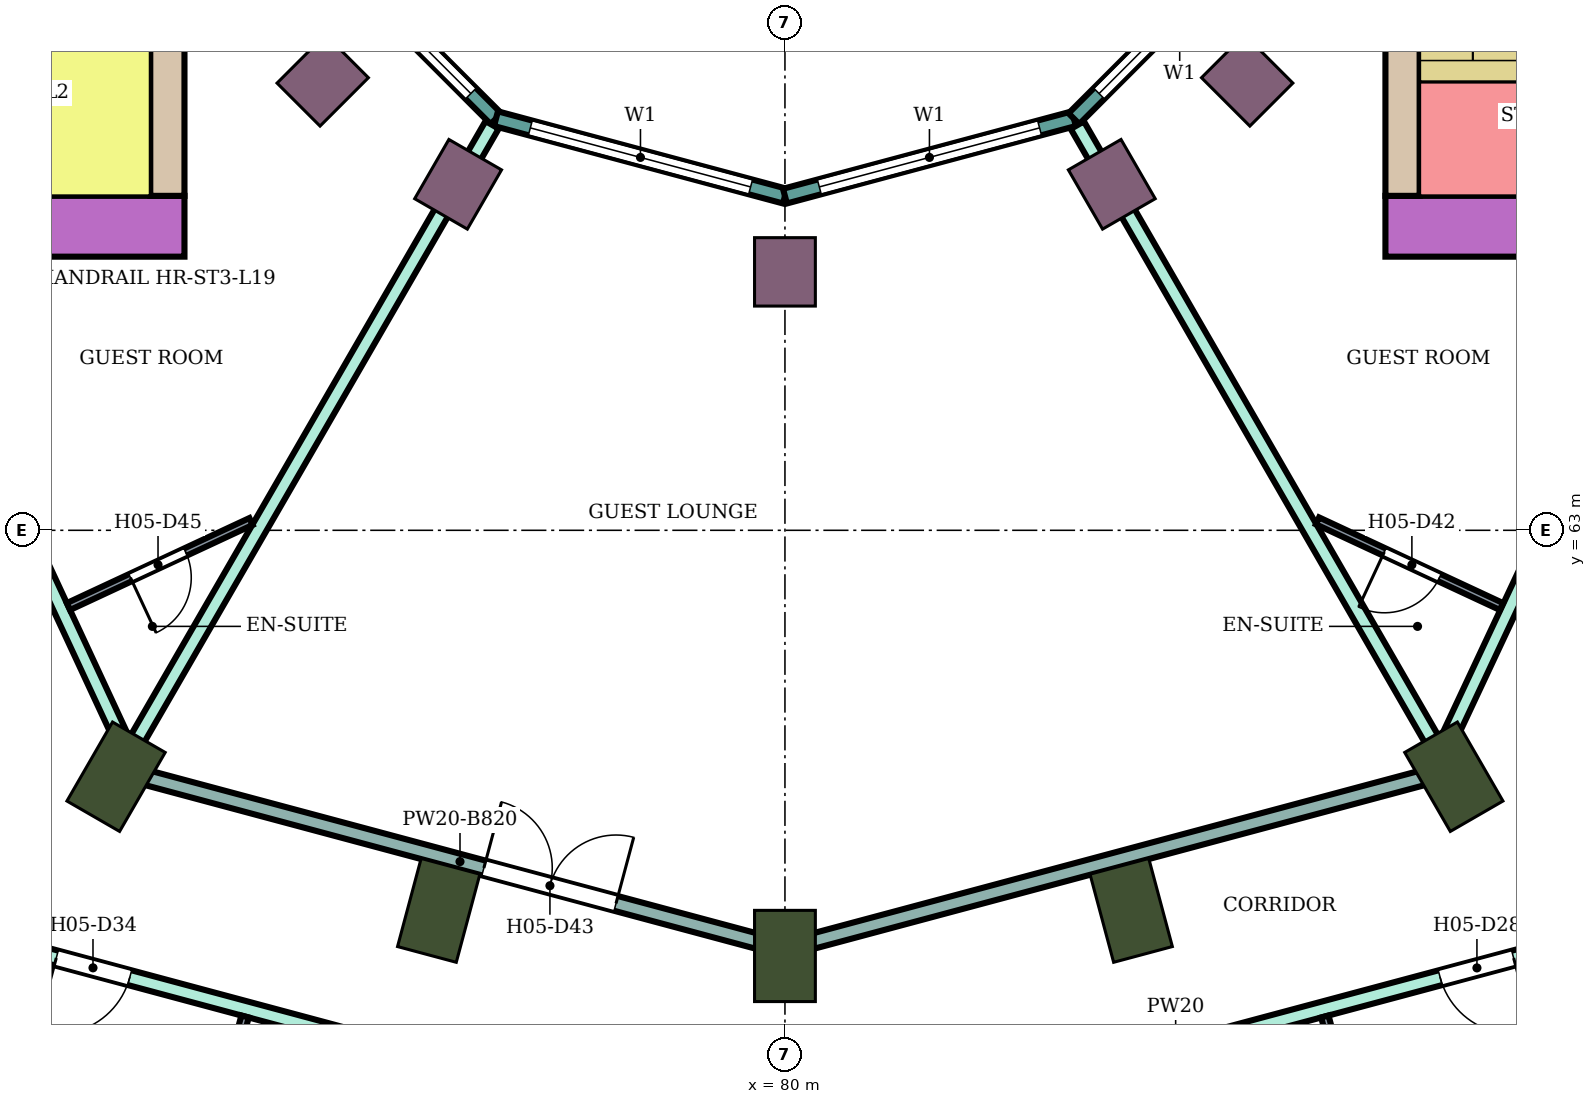
"""IFC4 building model, lengths in metres.
Left out: names, types, materials, properties, quantities, classifications, styles, units other than length and angle.
Written with IfcOpenShell. Run it as: python <this file> out.ifc"""

import sys

from ifc_helpers import new_model, si_unit, direction, frame, frame_2d, origin, origin_2d, place, context, subcontext, project, spatial, rectangle, extrude, element, fill, save


model = new_model("IFC4")
c1 = context("Model", 3, precision=1e-05, world=origin(), true_north=direction((0.0, 1.0)))
c2 = subcontext(c1, "Body", "Model", "MODEL_VIEW")
j1 = project(units=[si_unit("LENGTHUNIT", "METRE"), si_unit("PLANEANGLEUNIT", "RADIAN")], contexts=[c1])
p1 = place(None, origin())
s1 = spatial("IfcSite", under=j1, at=p1, CompositionType="ELEMENT")
p2 = place(p1, origin())
s2 = spatial("IfcBuilding", under=s1, at=p2, CompositionType="ELEMENT")
p3 = place(p2, frame((0.0, 0.0, 86.2)))
s3 = spatial("IfcBuildingStorey", under=s2, at=p3, CompositionType="ELEMENT", Elevation=86.2)
for number, where, z_axis, x_axis in (
    (1, (71.2, 59.758, 0.0), (0.0, 0.0, 1.0), (-0.5, -0.866, 0.0)),
    (2, (75.445, 58.0, 0.0), (0.0, 0.0, 1.0), (-0.259, -0.966, 0.0)),
    (3, (80.0, 57.4, 0.0), (0.0, 0.0, 1.0), (0.0, -1.0, 0.0)),
    (4, (84.555, 58.0, 0.0), (0.0, 0.0, 1.0), (0.259, -0.966, 0.0)),
    (5, (88.8, 59.758, 0.0), (0.0, 0.0, 1.0), (0.5, -0.866, 0.0)),
):
    element("IfcColumn", number, at=place(p3, frame(where, z_axis=z_axis, x_axis=x_axis)), inside=s3, PredefinedType="COLUMN", context=c2, shape_type="SweptSolid", body=[
        extrude(rectangle(XDim=1.2, YDim=0.8, at=origin_2d()), origin(), (0.0, 0.0, 1.0), 3.8),
    ])
for number, where, z_axis, x_axis in (
    (6, (73.919, 68.919, 0.0), (0.0, 0.0, 1.0), (-0.707, -0.707, 0.0)),
    (7, (75.7, 67.552, 0.0), (0.0, 0.0, 1.0), (-0.5, -0.866, 0.0)),
    (8, (80.0, 66.4, 0.0), (0.0, 0.0, 1.0), (0.0, -1.0, 0.0)),
    (9, (84.3, 67.552, 0.0), (0.0, 0.0, 1.0), (0.5, -0.866, 0.0)),
    (10, (86.081, 68.919, 0.0), (0.0, 0.0, 1.0), (0.707, -0.707, 0.0)),
):
    element("IfcColumn", number, at=place(p3, frame(where, z_axis=z_axis, x_axis=x_axis)), inside=s3, PredefinedType="COLUMN", context=c2, shape_type="SweptSolid", body=[
        extrude(rectangle(XDim=0.9, YDim=0.8, at=origin_2d()), origin(), (0.0, 0.0, 1.0), 3.8),
    ])
p4 = place(p3, frame((87.9, 67.0, 0.0), z_axis=(0.0, 0.0, 1.0), x_axis=(1.0, 0.0, 0.0)))
e11 = element("IfcWall", 11, at=p4, inside=s3, PredefinedType="SHEAR", context=c2, shape_type="SweptSolid", body=[
    extrude(rectangle(XDim=14.7, YDim=0.8, at=frame_2d((7.35, 0.0))), origin(), (0.0, 0.0, 1.0), 3.48),
])
p5 = place(p4, frame((4.2, 0.0, 0.0)))
e12 = element("IfcOpeningElement", 12, at=p5, cuts=e11, PredefinedType="OPENING", context=c2, shape_type="SweptSolid", body=[
    extrude(rectangle(XDim=2.4, YDim=2.4, at=frame_2d((1.2, 1.2))), frame((0.0, 0.41, 0.0), z_axis=(0.0, -1.0, 0.0), x_axis=(1.0, 0.0, 0.0)), (0.0, 0.0, 1.0), 0.82),
])
p6 = place(p3, frame((88.125, 67.4, 0.0), z_axis=(0.0, 0.0, 1.0), x_axis=(0.0, 1.0, 0.0)))
e13 = element("IfcWall", 13, at=p6, inside=s3, PredefinedType="SHEAR", context=c2, shape_type="SweptSolid", body=[
    extrude(rectangle(XDim=7.6, YDim=0.45, at=frame_2d((3.8, 0.0))), origin(), (0.0, 0.0, 1.0), 3.48),
])
p7 = place(p3, frame((72.1, 67.0, 0.0), z_axis=(0.0, 0.0, 1.0), x_axis=(-1.0, 0.0, 0.0)))
e14 = element("IfcWall", 14, at=p7, inside=s3, PredefinedType="SHEAR", context=c2, shape_type="SweptSolid", body=[
    extrude(rectangle(XDim=14.7, YDim=0.8, at=frame_2d((7.35, 0.0))), origin(), (0.0, 0.0, 1.0), 3.48),
])
p8 = place(p7, frame((4.2, 0.0, 0.0)))
e15 = element("IfcOpeningElement", 15, at=p8, cuts=e14, PredefinedType="OPENING", context=c2, shape_type="SweptSolid", body=[
    extrude(rectangle(XDim=2.4, YDim=2.4, at=frame_2d((1.2, 1.2))), frame((0.0, 0.41, 0.0), z_axis=(0.0, -1.0, 0.0), x_axis=(1.0, 0.0, 0.0)), (0.0, 0.0, 1.0), 0.82),
])
p9 = place(p3, frame((71.875, 75.0, 0.0), z_axis=(0.0, 0.0, 1.0), x_axis=(0.0, -1.0, 0.0)))
e16 = element("IfcWall", 16, at=p9, inside=s3, PredefinedType="SHEAR", context=c2, shape_type="SweptSolid", body=[
    extrude(rectangle(XDim=7.6, YDim=0.45, at=frame_2d((3.8, 0.0))), origin(), (0.0, 0.0, 1.0), 3.48),
])
p10 = place(p3, frame((73.415, 71.198, 0.0), z_axis=(0.0, 0.0, 1.0), x_axis=(0.707106781187, -0.707106781187, 0.0)))
e17 = element("IfcWall", 17, at=p10, inside=s3, PredefinedType="NOTDEFINED", context=c2, shape_type="SweptSolid", body=[
    extrude(rectangle(XDim=3.936, YDim=0.2, at=frame_2d((1.968, 0.0))), origin(), (0.0, 0.0, 1.0), 3.8),
])
p11 = place(p10, frame((0.468, 0.0, 0.9)))
e18 = element("IfcOpeningElement", 18, at=p11, cuts=e17, PredefinedType="OPENING", context=c2, shape_type="SweptSolid", body=[
    extrude(rectangle(XDim=3.0, YDim=2.3, at=frame_2d((1.5, 1.15))), frame((0.0, 0.11, 0.0), z_axis=(0.0, -1.0, 0.0), x_axis=(1.0, 0.0, 0.0)), (0.0, 0.0, 1.0), 0.22),
])
p12 = place(p3, frame((76.198, 68.415, 0.0), z_axis=(0.0, 0.0, 1.0), x_axis=(0.965933654434, -0.258789828301, 0.0)))
e19 = element("IfcWall", 19, at=p12, inside=s3, PredefinedType="NOTDEFINED", context=c2, shape_type="SweptSolid", body=[
    extrude(rectangle(XDim=3.936, YDim=0.2, at=frame_2d((1.968, 0.0))), origin(), (0.0, 0.0, 1.0), 3.8),
])
p13 = place(p12, frame((0.468, 0.0, 0.9)))
e20 = element("IfcOpeningElement", 20, at=p13, cuts=e19, PredefinedType="OPENING", context=c2, shape_type="SweptSolid", body=[
    extrude(rectangle(XDim=3.0, YDim=2.3, at=frame_2d((1.5, 1.15))), frame((0.0, 0.11, 0.0), z_axis=(0.0, -1.0, 0.0), x_axis=(1.0, 0.0, 0.0)), (0.0, 0.0, 1.0), 0.22),
])
p14 = place(p3, frame((80.0, 67.396, 0.0), z_axis=(0.0, 0.0, 1.0), x_axis=(0.965933654434, 0.258789828301, 0.0)))
e21 = element("IfcWall", 21, at=p14, inside=s3, PredefinedType="NOTDEFINED", context=c2, shape_type="SweptSolid", body=[
    extrude(rectangle(XDim=3.936, YDim=0.2, at=frame_2d((1.968, 0.0))), origin(), (0.0, 0.0, 1.0), 3.8),
])
p15 = place(p14, frame((0.468, 0.0, 0.9)))
e22 = element("IfcOpeningElement", 22, at=p15, cuts=e21, PredefinedType="OPENING", context=c2, shape_type="SweptSolid", body=[
    extrude(rectangle(XDim=3.0, YDim=2.3, at=frame_2d((1.5, 1.15))), frame((0.0, 0.11, 0.0), z_axis=(0.0, -1.0, 0.0), x_axis=(1.0, 0.0, 0.0)), (0.0, 0.0, 1.0), 0.22),
])
p16 = place(p3, frame((83.802, 68.415, 0.0), z_axis=(0.0, 0.0, 1.0), x_axis=(0.707106781187, 0.707106781187, 0.0)))
e23 = element("IfcWall", 23, at=p16, inside=s3, PredefinedType="NOTDEFINED", context=c2, shape_type="SweptSolid", body=[
    extrude(rectangle(XDim=3.936, YDim=0.2, at=frame_2d((1.968, 0.0))), origin(), (0.0, 0.0, 1.0), 3.8),
])
p17 = place(p16, frame((0.468, 0.0, 0.9)))
e24 = element("IfcOpeningElement", 24, at=p17, cuts=e23, PredefinedType="OPENING", context=c2, shape_type="SweptSolid", body=[
    extrude(rectangle(XDim=3.0, YDim=2.3, at=frame_2d((1.5, 1.15))), frame((0.0, 0.11, 0.0), z_axis=(0.0, -1.0, 0.0), x_axis=(1.0, 0.0, 0.0)), (0.0, 0.0, 1.0), 0.22),
])
p18 = place(p3, frame((68.321, 66.6, 0.0), z_axis=(0.0, 0.0, 1.0), x_axis=(0.421914092414, -0.906635813666, 0.0)))
e25 = element("IfcWall", 25, at=p18, inside=s3, PredefinedType="PARTITIONING", context=c2, shape_type="SweptSolid", body=[
    extrude(rectangle(XDim=7.459, YDim=0.2, at=frame_2d((3.73, 0.0))), origin(), (0.0, 0.0, 1.0), 3.35),
])
p19 = place(p18, frame((0.7, 0.0, 0.0)))
e26 = element("IfcOpeningElement", 26, at=p19, cuts=e25, PredefinedType="OPENING", context=c2, shape_type="SweptSolid", body=[
    extrude(rectangle(XDim=1.0, YDim=2.1, at=frame_2d((0.5, 1.05))), frame((0.0, 0.11, 0.0), z_axis=(0.0, -1.0, 0.0), x_axis=(1.0, 0.0, 0.0)), (0.0, 0.0, 1.0), 0.22),
])
p20 = place(p3, frame((69.652, 57.578, 0.0), z_axis=(0.0, 0.0, 1.0), x_axis=(0.965857425723, -0.259074184695, 0.0)))
e27 = element("IfcWall", 27, at=p20, inside=s3, PredefinedType="PARTITIONING", context=c2, shape_type="SweptSolid", body=[
    extrude(rectangle(XDim=10.623, YDim=0.2, at=frame_2d((5.312, 0.0))), origin(), (0.0, 0.0, 1.0), 3.35),
])
p21 = place(p20, frame((9.163, 0.0, 0.0)))
e28 = element("IfcOpeningElement", 28, at=p21, cuts=e27, PredefinedType="OPENING", context=c2, shape_type="SweptSolid", body=[
    extrude(rectangle(XDim=1.0, YDim=2.1, at=frame_2d((0.5, 1.05))), frame((0.0, 0.11, 0.0), z_axis=(0.0, -1.0, 0.0), x_axis=(1.0, 0.0, 0.0)), (0.0, 0.0, 1.0), 0.22),
])
p22 = place(p20, frame((0.788, 0.0, 0.0)))
e29 = element("IfcOpeningElement", 29, at=p22, cuts=e27, PredefinedType="OPENING", context=c2, shape_type="SweptSolid", body=[
    extrude(rectangle(XDim=1.0, YDim=2.1, at=frame_2d((0.5, 1.05))), frame((0.0, 0.11, 0.0), z_axis=(0.0, -1.0, 0.0), x_axis=(1.0, 0.0, 0.0)), (0.0, 0.0, 1.0), 0.22),
])
p23 = place(p3, frame((71.459, 60.218, 0.0), z_axis=(0.0, 0.0, 1.0), x_axis=(0.500232027118, 0.865891401416, 0.0)))
e30 = element("IfcWall", 30, at=p23, inside=s3, PredefinedType="PARTITIONING", context=c2, shape_type="SweptSolid", body=[
    extrude(rectangle(XDim=9.372, YDim=0.2, at=frame_2d((4.686, 0.0))), origin(), (0.0, 0.0, 1.0), 3.35),
])
p24 = place(p3, frame((71.498, 59.774, 0.0), z_axis=(0.0, 0.0, 1.0), x_axis=(0.965911938046, -0.258870871168, 0.0)))
e31 = element("IfcWall", 31, at=p24, inside=s3, PredefinedType="PARTITIONING", context=c2, shape_type="SweptSolid", body=[
    extrude(rectangle(XDim=8.752, YDim=0.2, at=frame_2d((4.376, 0.0))), origin(), (0.0, 0.0, 1.0), 2.98),
])
p25 = place(p24, frame((4.701, 0.0, 0.0)))
e32 = element("IfcOpeningElement", 32, at=p25, cuts=e31, PredefinedType="OPENING", context=c2, shape_type="SweptSolid", body=[
    extrude(rectangle(XDim=1.8, YDim=2.1, at=frame_2d((0.9, 1.05))), frame((0.0, 0.11, 0.0), z_axis=(0.0, -1.0, 0.0), x_axis=(1.0, 0.0, 0.0)), (0.0, 0.0, 1.0), 0.22),
])
p26 = place(p3, frame((80.0, 54.805, 0.0), z_axis=(0.0, 0.0, 1.0), x_axis=(0.965962177934, 0.258683340788, 0.0)))
e33 = element("IfcWall", 33, at=p26, inside=s3, PredefinedType="PARTITIONING", context=c2, shape_type="SweptSolid", body=[
    extrude(rectangle(XDim=10.643, YDim=0.2, at=frame_2d((5.322, 0.0))), origin(), (0.0, 0.0, 1.0), 3.35),
])
p27 = place(p26, frame((8.925, 0.0, 0.0)))
e34 = element("IfcOpeningElement", 34, at=p27, cuts=e33, PredefinedType="OPENING", context=c2, shape_type="SweptSolid", body=[
    extrude(rectangle(XDim=1.0, YDim=2.1, at=frame_2d((0.5, 1.05))), frame((0.0, 0.11, 0.0), z_axis=(0.0, -1.0, 0.0), x_axis=(1.0, 0.0, 0.0)), (0.0, 0.0, 1.0), 0.22),
])
p28 = place(p26, frame((0.55, 0.0, 0.0)))
e35 = element("IfcOpeningElement", 35, at=p28, cuts=e33, PredefinedType="OPENING", context=c2, shape_type="SweptSolid", body=[
    extrude(rectangle(XDim=1.0, YDim=2.1, at=frame_2d((0.5, 1.05))), frame((0.0, 0.11, 0.0), z_axis=(0.0, -1.0, 0.0), x_axis=(1.0, 0.0, 0.0)), (0.0, 0.0, 1.0), 0.22),
])
p29 = place(p3, frame((80.0, 57.496, 0.0), z_axis=(0.0, 0.0, 1.0), x_axis=(0.96592471314, 0.258823199396, 0.0)))
e36 = element("IfcWall", 36, at=p29, inside=s3, PredefinedType="PARTITIONING", context=c2, shape_type="SweptSolid", body=[
    extrude(rectangle(XDim=8.732, YDim=0.2, at=frame_2d((4.366, 0.0))), origin(), (0.0, 0.0, 1.0), 2.98),
])
p30 = place(p3, frame((83.846, 68.33, 0.0), z_axis=(0.0, 0.0, 1.0), x_axis=(0.499822319857, -0.866127963163, 0.0)))
e37 = element("IfcWall", 37, at=p30, inside=s3, PredefinedType="PARTITIONING", context=c2, shape_type="SweptSolid", body=[
    extrude(rectangle(XDim=9.382, YDim=0.2, at=frame_2d((4.691, 0.0))), origin(), (0.0, 0.0, 1.0), 3.35),
])
p31 = place(p3, frame((88.501, 59.775, 0.0), z_axis=(0.0, 0.0, 1.0), x_axis=(0.424700525505, 0.905333896215, 0.0)))
e38 = element("IfcWall", 38, at=p31, inside=s3, PredefinedType="PARTITIONING", context=c2, shape_type="SweptSolid", body=[
    extrude(rectangle(XDim=7.53, YDim=0.2, at=frame_2d((3.765, 0.0))), origin(), (0.0, 0.0, 1.0), 3.35),
])
p32 = place(p31, frame((5.83, 0.0, 0.0)))
e39 = element("IfcOpeningElement", 39, at=p32, cuts=e38, PredefinedType="OPENING", context=c2, shape_type="SweptSolid", body=[
    extrude(rectangle(XDim=1.0, YDim=2.1, at=frame_2d((0.5, 1.05))), frame((0.0, 0.11, 0.0), z_axis=(0.0, -1.0, 0.0), x_axis=(1.0, 0.0, 0.0)), (0.0, 0.0, 1.0), 0.22),
])
p33 = place(p3, frame((70.574, 61.997, 0.0), z_axis=(0.0, 0.0, 1.0), x_axis=(0.906503026865, 0.422199315826, 0.0)))
e40 = element("IfcWall", 40, at=p33, inside=s3, PredefinedType="PARTITIONING", context=c2, shape_type="SweptSolid", body=[
    extrude(rectangle(XDim=2.65, YDim=0.1, at=frame_2d((1.325, 0.0))), origin(), (0.0, 0.0, 1.0), 3.35),
])
p34 = place(p33, frame((0.9, 0.0, 0.0)))
e41 = element("IfcOpeningElement", 41, at=p34, cuts=e40, PredefinedType="OPENING", context=c2, shape_type="SweptSolid", body=[
    extrude(rectangle(XDim=0.8, YDim=2.1, at=frame_2d((0.4, 1.05))), frame((0.0, 0.06, 0.0), z_axis=(0.0, -1.0, 0.0), x_axis=(1.0, 0.0, 0.0)), (0.0, 0.0, 1.0), 0.12),
])
p35 = place(p3, frame((72.211, 54.044, 0.0), z_axis=(0.0, 0.0, 1.0), x_axis=(0.258866552082, 0.96591309558, 0.0)))
e42 = element("IfcWall", 42, at=p35, inside=s3, PredefinedType="PARTITIONING", context=c2, shape_type="SweptSolid", body=[
    extrude(rectangle(XDim=2.65, YDim=0.1, at=frame_2d((1.325, 0.0))), origin(), (0.0, 0.0, 1.0), 3.35),
])
p36 = place(p35, frame((0.95, 0.0, 0.0)))
e43 = element("IfcOpeningElement", 43, at=p36, cuts=e42, PredefinedType="OPENING", context=c2, shape_type="SweptSolid", body=[
    extrude(rectangle(XDim=0.8, YDim=2.1, at=frame_2d((0.4, 1.05))), frame((0.0, 0.06, 0.0), z_axis=(0.0, -1.0, 0.0), x_axis=(1.0, 0.0, 0.0)), (0.0, 0.0, 1.0), 0.12),
])
p37 = place(p3, frame((87.006, 63.124, 0.0), z_axis=(0.0, 0.0, 1.0), x_axis=(0.906535604863, -0.422129360642, 0.0)))
e44 = element("IfcWall", 44, at=p37, inside=s3, PredefinedType="PARTITIONING", context=c2, shape_type="SweptSolid", body=[
    extrude(rectangle(XDim=2.67, YDim=0.1, at=frame_2d((1.335, 0.0))), origin(), (0.0, 0.0, 1.0), 3.35),
])
p38 = place(p37, frame((0.97, 0.0, 0.0)))
e45 = element("IfcOpeningElement", 45, at=p38, cuts=e44, PredefinedType="OPENING", context=c2, shape_type="SweptSolid", body=[
    extrude(rectangle(XDim=0.8, YDim=2.1, at=frame_2d((0.4, 1.05))), frame((0.0, 0.06, 0.0), z_axis=(0.0, -1.0, 0.0), x_axis=(1.0, 0.0, 0.0)), (0.0, 0.0, 1.0), 0.12),
])
p39 = place(p3, frame((87.103, 56.604, 0.0), z_axis=(0.0, 0.0, 1.0), x_axis=(0.258883730688, -0.965908491517, 0.0)))
e46 = element("IfcWall", 46, at=p39, inside=s3, PredefinedType="PARTITIONING", context=c2, shape_type="SweptSolid", body=[
    extrude(rectangle(XDim=2.7, YDim=0.1, at=frame_2d((1.35, 0.0))), origin(), (0.0, 0.0, 1.0), 3.35),
])
p40 = place(p39, frame((0.9, 0.0, 0.0)))
e47 = element("IfcOpeningElement", 47, at=p40, cuts=e46, PredefinedType="OPENING", context=c2, shape_type="SweptSolid", body=[
    extrude(rectangle(XDim=0.8, YDim=2.1, at=frame_2d((0.4, 1.05))), frame((0.0, 0.06, 0.0), z_axis=(0.0, -1.0, 0.0), x_axis=(1.0, 0.0, 0.0)), (0.0, 0.0, 1.0), 0.12),
])
p41 = place(p11, origin())
e48 = element("IfcWindow", 48, at=p41, inside=s3, PartitioningType="SINGLE_PANEL", PredefinedType="WINDOW", context=c2, shape_type="SweptSolid", body=[
    extrude(rectangle(XDim=3.0, YDim=2.3, at=frame_2d((1.5, 1.15))), frame((0.0, 0.03, 0.0), z_axis=(0.0, -1.0, 0.0), x_axis=(1.0, 0.0, 0.0)), (0.0, 0.0, 1.0), 0.06),
])
fill(e18, e48)
p42 = place(p13, origin())
e49 = element("IfcWindow", 49, at=p42, inside=s3, PartitioningType="SINGLE_PANEL", PredefinedType="WINDOW", context=c2, shape_type="SweptSolid", body=[
    extrude(rectangle(XDim=3.0, YDim=2.3, at=frame_2d((1.5, 1.15))), frame((0.0, 0.03, 0.0), z_axis=(0.0, -1.0, 0.0), x_axis=(1.0, 0.0, 0.0)), (0.0, 0.0, 1.0), 0.06),
])
fill(e20, e49)
p43 = place(p15, origin())
e50 = element("IfcWindow", 50, at=p43, inside=s3, PartitioningType="SINGLE_PANEL", PredefinedType="WINDOW", context=c2, shape_type="SweptSolid", body=[
    extrude(rectangle(XDim=3.0, YDim=2.3, at=frame_2d((1.5, 1.15))), frame((0.0, 0.03, 0.0), z_axis=(0.0, -1.0, 0.0), x_axis=(1.0, 0.0, 0.0)), (0.0, 0.0, 1.0), 0.06),
])
fill(e22, e50)
p44 = place(p17, origin())
e51 = element("IfcWindow", 51, at=p44, inside=s3, PartitioningType="SINGLE_PANEL", PredefinedType="WINDOW", context=c2, shape_type="SweptSolid", body=[
    extrude(rectangle(XDim=3.0, YDim=2.3, at=frame_2d((1.5, 1.15))), frame((0.0, 0.03, 0.0), z_axis=(0.0, -1.0, 0.0), x_axis=(1.0, 0.0, 0.0)), (0.0, 0.0, 1.0), 0.06),
])
fill(e24, e51)
p45 = place(p27, frame((1.0, 0.0, 0.0), z_axis=(0.0, 0.0, 1.0), x_axis=(-1.0, 0.0, 0.0)))
e52 = element("IfcDoor", 52, at=p45, inside=s3, OperationType="SINGLE_SWING_LEFT", PredefinedType="DOOR", context=c2, shape_type="SweptSolid", body=[
    extrude(rectangle(XDim=1.0, YDim=2.1, at=frame_2d((0.5, 1.05))), frame((0.0, 0.025, 0.0), z_axis=(0.0, -1.0, 0.0), x_axis=(1.0, 0.0, 0.0)), (0.0, 0.0, 1.0), 0.05),
])
fill(e34, e52)
p46 = place(p22, frame((1.0, 0.0, 0.0), z_axis=(0.0, 0.0, 1.0), x_axis=(-1.0, 0.0, 0.0)))
e53 = element("IfcDoor", 53, at=p46, inside=s3, OperationType="SINGLE_SWING_RIGHT", PredefinedType="DOOR", context=c2, shape_type="SweptSolid", body=[
    extrude(rectangle(XDim=1.0, YDim=2.1, at=frame_2d((0.5, 1.05))), frame((0.0, 0.025, 0.0), z_axis=(0.0, -1.0, 0.0), x_axis=(1.0, 0.0, 0.0)), (0.0, 0.0, 1.0), 0.05),
])
fill(e29, e53)
p47 = place(p38, frame((0.8, 0.0, 0.0), z_axis=(0.0, 0.0, 1.0), x_axis=(-1.0, 0.0, 0.0)))
e54 = element("IfcDoor", 54, at=p47, inside=s3, OperationType="SINGLE_SWING_RIGHT", PredefinedType="DOOR", context=c2, shape_type="SweptSolid", body=[
    extrude(rectangle(XDim=0.8, YDim=2.1, at=frame_2d((0.4, 1.05))), frame((0.0, 0.025, 0.0), z_axis=(0.0, -1.0, 0.0), x_axis=(1.0, 0.0, 0.0)), (0.0, 0.0, 1.0), 0.05),
])
fill(e45, e54)
p48 = place(p25, origin())
e55 = element("IfcDoor", 55, at=p48, inside=s3, OperationType="DOUBLE_DOOR_SINGLE_SWING", PredefinedType="DOOR", context=c2, shape_type="SweptSolid", body=[
    extrude(rectangle(XDim=1.8, YDim=2.1, at=frame_2d((0.9, 1.05))), frame((0.0, 0.025, 0.0), z_axis=(0.0, -1.0, 0.0), x_axis=(1.0, 0.0, 0.0)), (0.0, 0.0, 1.0), 0.05),
])
fill(e32, e55)
p49 = place(p34, frame((0.8, 0.0, 0.0), z_axis=(0.0, 0.0, 1.0), x_axis=(-1.0, 0.0, 0.0)))
e56 = element("IfcDoor", 56, at=p49, inside=s3, OperationType="SINGLE_SWING_RIGHT", PredefinedType="DOOR", context=c2, shape_type="SweptSolid", body=[
    extrude(rectangle(XDim=0.8, YDim=2.1, at=frame_2d((0.4, 1.05))), frame((0.0, 0.025, 0.0), z_axis=(0.0, -1.0, 0.0), x_axis=(1.0, 0.0, 0.0)), (0.0, 0.0, 1.0), 0.05),
])
fill(e41, e56)
save(model, sys.argv[1])
